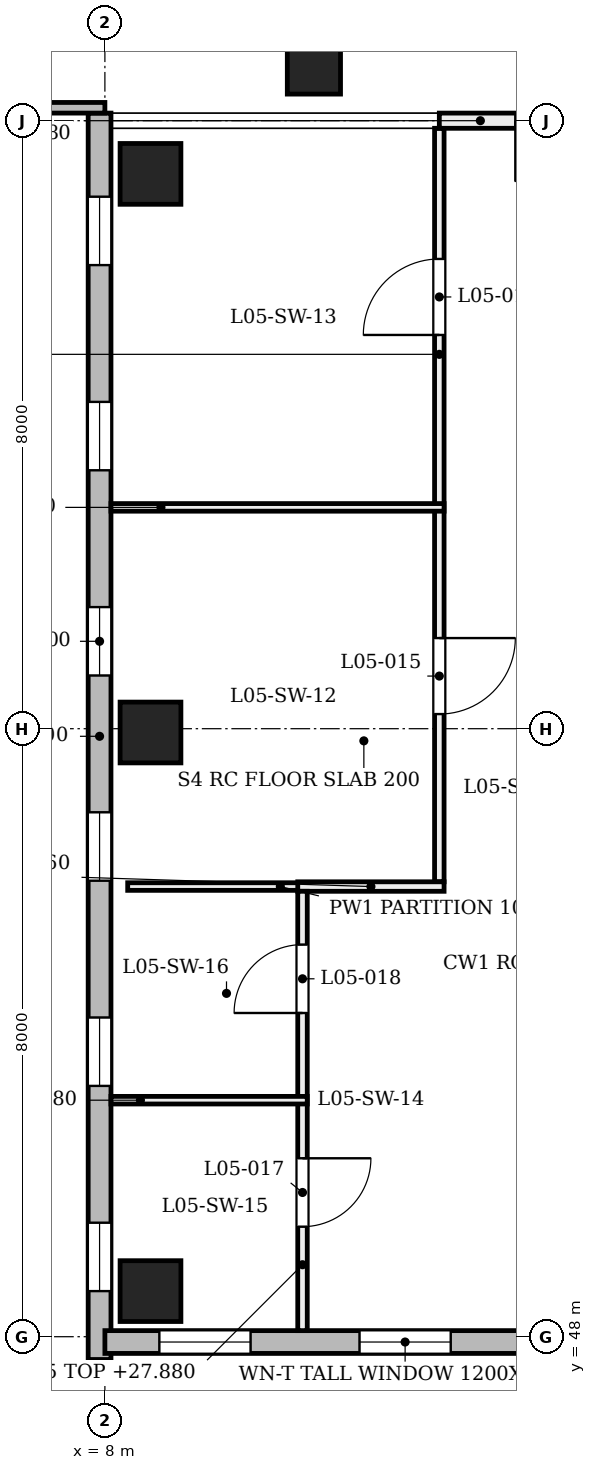
"""IFC4 building model, lengths in metres.
Left out: names, types, materials, properties, quantities, classifications, styles, units other than length and angle.
Written with IfcOpenShell. Run it as: python <this file> out.ifc"""

import sys

from ifc_helpers import new_model, si_unit, direction, frame, frame_2d, origin, origin_2d, place, context, subcontext, project, spatial, rectangle, extrude, element, fill, save


model = new_model("IFC4")
c1 = context("Model", 3, precision=1e-05, world=origin(), true_north=direction((0.0, 1.0)))
c2 = subcontext(c1, "Body", "Model", "MODEL_VIEW")
j1 = project(units=[si_unit("LENGTHUNIT", "METRE"), si_unit("PLANEANGLEUNIT", "RADIAN")], contexts=[c1])
p1 = place(None, origin())
s1 = spatial("IfcSite", under=j1, at=p1, CompositionType="ELEMENT")
p2 = place(p1, origin())
s2 = spatial("IfcBuilding", under=s1, at=p2, CompositionType="ELEMENT")
p3 = place(p2, frame((0.0, 0.0, 24.0)))
s3 = spatial("IfcBuildingStorey", under=s2, at=p3, CompositionType="ELEMENT", Elevation=24.0)
for number, where, z_axis, x_axis in (
    (1, (8.6, 48.6, 0.0), (0.0, 0.0, 1.0), (1.0, 0.0, 0.0)),
    (2, (8.6, 55.95, 0.0), (0.0, 0.0, 1.0), (1.0, 0.0, 0.0)),
    (3, (8.6, 63.3, 0.0), (0.0, 0.0, 1.0), (1.0, 0.0, 0.0)),
):
    element("IfcColumn", number, at=place(p3, frame(where, z_axis=z_axis, x_axis=x_axis)), inside=s3, PredefinedType="COLUMN", context=c2, shape_type="SweptSolid", body=[
        extrude(rectangle(XDim=0.8, YDim=0.8, at=origin_2d()), origin(), (0.0, 0.0, 1.0), 4.8),
    ])
p4 = place(p3, frame((11.0, 64.7, 0.0), z_axis=(-0.203937582782, 0.0, 0.978983892783), x_axis=(0.0, -1.0, 0.0)))
e4 = element("IfcColumn", 4, at=p4, inside=s3, PredefinedType="COLUMN", context=c2, shape_type="SweptSolid", body=[
    extrude(rectangle(XDim=0.7, YDim=0.7, at=origin_2d()), origin(), (0.0, 0.0, 1.0), 4.678),
])
p5 = place(p3, frame((7.93, 47.7, 0.0), z_axis=(0.0, 0.0, 1.0), x_axis=(0.0, 1.0, 0.0)))
e5 = element("IfcWall", 5, at=p5, inside=s3, PredefinedType="SOLIDWALL", context=c2, shape_type="SweptSolid", body=[
    extrude(rectangle(XDim=16.4, YDim=0.3, at=frame_2d((8.2, 0.0))), origin(), (0.0, 0.0, 1.0), 3.9),
])
p6 = place(p5, frame((0.9, 0.0, 0.75)))
e6 = element("IfcOpeningElement", 6, at=p6, cuts=e5, PredefinedType="OPENING", context=c2, shape_type="SweptSolid", body=[
    extrude(rectangle(XDim=0.9, YDim=3.1, at=frame_2d((0.45, 1.55))), frame((0.0, 0.16, 0.0), z_axis=(0.0, -1.0, 0.0), x_axis=(1.0, 0.0, 0.0)), (0.0, 0.0, 1.0), 0.32),
])
p7 = place(p5, frame((3.6, 0.0, 0.75)))
e7 = element("IfcOpeningElement", 7, at=p7, cuts=e5, PredefinedType="OPENING", context=c2, shape_type="SweptSolid", body=[
    extrude(rectangle(XDim=0.9, YDim=3.1, at=frame_2d((0.45, 1.55))), frame((0.0, 0.16, 0.0), z_axis=(0.0, -1.0, 0.0), x_axis=(1.0, 0.0, 0.0)), (0.0, 0.0, 1.0), 0.32),
])
p8 = place(p5, frame((6.3, 0.0, 0.75)))
e8 = element("IfcOpeningElement", 8, at=p8, cuts=e5, PredefinedType="OPENING", context=c2, shape_type="SweptSolid", body=[
    extrude(rectangle(XDim=0.9, YDim=3.1, at=frame_2d((0.45, 1.55))), frame((0.0, 0.16, 0.0), z_axis=(0.0, -1.0, 0.0), x_axis=(1.0, 0.0, 0.0)), (0.0, 0.0, 1.0), 0.32),
])
p9 = place(p5, frame((9.0, 0.0, 0.75)))
e9 = element("IfcOpeningElement", 9, at=p9, cuts=e5, PredefinedType="OPENING", context=c2, shape_type="SweptSolid", body=[
    extrude(rectangle(XDim=0.9, YDim=3.1, at=frame_2d((0.45, 1.55))), frame((0.0, 0.16, 0.0), z_axis=(0.0, -1.0, 0.0), x_axis=(1.0, 0.0, 0.0)), (0.0, 0.0, 1.0), 0.32),
])
p10 = place(p5, frame((11.7, 0.0, 0.75)))
e10 = element("IfcOpeningElement", 10, at=p10, cuts=e5, PredefinedType="OPENING", context=c2, shape_type="SweptSolid", body=[
    extrude(rectangle(XDim=0.9, YDim=3.1, at=frame_2d((0.45, 1.55))), frame((0.0, 0.16, 0.0), z_axis=(0.0, -1.0, 0.0), x_axis=(1.0, 0.0, 0.0)), (0.0, 0.0, 1.0), 0.32),
])
p11 = place(p5, frame((14.4, 0.0, 0.75)))
e11 = element("IfcOpeningElement", 11, at=p11, cuts=e5, PredefinedType="OPENING", context=c2, shape_type="SweptSolid", body=[
    extrude(rectangle(XDim=0.9, YDim=3.1, at=frame_2d((0.45, 1.55))), frame((0.0, 0.16, 0.0), z_axis=(0.0, -1.0, 0.0), x_axis=(1.0, 0.0, 0.0)), (0.0, 0.0, 1.0), 0.32),
])
p12 = place(p3, frame((8.0, 47.93, 0.0), z_axis=(0.0, 0.0, 1.0), x_axis=(1.0, 0.0, 0.0)))
e12 = element("IfcWall", 12, at=p12, inside=s3, PredefinedType="SOLIDWALL", context=c2, shape_type="SweptSolid", body=[
    extrude(rectangle(XDim=7.9, YDim=0.3, at=frame_2d((3.95, 0.0))), origin(), (0.0, 0.0, 1.0), 3.9),
])
p13 = place(p12, frame((0.717, 0.0, 0.75)))
e13 = element("IfcOpeningElement", 13, at=p13, cuts=e12, PredefinedType="OPENING", context=c2, shape_type="SweptSolid", body=[
    extrude(rectangle(XDim=1.2, YDim=3.1, at=frame_2d((0.6, 1.55))), frame((0.0, 0.16, 0.0), z_axis=(0.0, -1.0, 0.0), x_axis=(1.0, 0.0, 0.0)), (0.0, 0.0, 1.0), 0.32),
])
p14 = place(p12, frame((3.35, 0.0, 0.75)))
e14 = element("IfcOpeningElement", 14, at=p14, cuts=e12, PredefinedType="OPENING", context=c2, shape_type="SweptSolid", body=[
    extrude(rectangle(XDim=1.2, YDim=3.1, at=frame_2d((0.6, 1.55))), frame((0.0, 0.16, 0.0), z_axis=(0.0, -1.0, 0.0), x_axis=(1.0, 0.0, 0.0)), (0.0, 0.0, 1.0), 0.32),
])
p15 = place(p12, frame((5.983, 0.0, 0.75)))
e15 = element("IfcOpeningElement", 15, at=p15, cuts=e12, PredefinedType="OPENING", context=c2, shape_type="SweptSolid", body=[
    extrude(rectangle(XDim=1.2, YDim=3.1, at=frame_2d((0.6, 1.55))), frame((0.0, 0.16, 0.0), z_axis=(0.0, -1.0, 0.0), x_axis=(1.0, 0.0, 0.0)), (0.0, 0.0, 1.0), 0.32),
])
p16 = place(p3, frame((3.0, 64.17, 0.0), z_axis=(0.0, 0.0, 1.0), x_axis=(1.0, 0.0, 0.0)))
e16 = element("IfcWall", 16, at=p16, inside=s3, PredefinedType="SOLIDWALL", context=c2, shape_type="SweptSolid", body=[
    extrude(rectangle(XDim=5.0, YDim=0.14, at=frame_2d((2.5, 0.0))), origin(), (0.0, 0.0, 1.0), 3.9),
])
p17 = place(p3, frame((12.4, 53.986, 0.0), z_axis=(0.0, 0.0, 1.0), x_axis=(0.0, 1.0, 0.0)))
e17 = element("IfcWall", 17, at=p17, inside=s3, PredefinedType="PARTITIONING", context=c2, shape_type="SweptSolid", body=[
    extrude(rectangle(XDim=9.914, YDim=0.125, at=frame_2d((4.957, 0.0))), origin(), (0.0, 0.0, 1.0), 3.88),
])
p18 = place(p17, frame((2.207, 0.0, 0.0)))
e18 = element("IfcOpeningElement", 18, at=p18, cuts=e17, PredefinedType="OPENING", context=c2, shape_type="SweptSolid", body=[
    extrude(rectangle(XDim=1.0, YDim=2.1, at=frame_2d((0.5, 1.05))), frame((0.0, 0.073, 0.0), z_axis=(0.0, -1.0, 0.0), x_axis=(1.0, 0.0, 0.0)), (0.0, 0.0, 1.0), 0.145),
])
p19 = place(p17, frame((7.195, 0.0, 0.0)))
e19 = element("IfcOpeningElement", 19, at=p19, cuts=e17, PredefinedType="OPENING", context=c2, shape_type="SweptSolid", body=[
    extrude(rectangle(XDim=1.0, YDim=2.1, at=frame_2d((0.5, 1.05))), frame((0.0, 0.073, 0.0), z_axis=(0.0, -1.0, 0.0), x_axis=(1.0, 0.0, 0.0)), (0.0, 0.0, 1.0), 0.145),
])
p20 = place(p3, frame((8.3, 53.923, 0.0), z_axis=(0.0, 0.0, 1.0), x_axis=(1.0, 0.0, 0.0)))
e20 = element("IfcWall", 20, at=p20, inside=s3, PredefinedType="PARTITIONING", context=c2, shape_type="SweptSolid", body=[
    extrude(rectangle(XDim=2.363, YDim=0.1, at=frame_2d((1.181, 0.0))), origin(), (0.0, 0.0, 1.0), 3.98),
])
p21 = place(p3, frame((10.538, 53.923, 0.0), z_axis=(0.0, 0.0, 1.0), x_axis=(1.0, 0.0, 0.0)))
e21 = element("IfcWall", 21, at=p21, inside=s3, PredefinedType="PARTITIONING", context=c2, shape_type="SweptSolid", body=[
    extrude(rectangle(XDim=1.925, YDim=0.125, at=frame_2d((0.962, 0.0))), origin(), (0.0, 0.0, 1.0), 4.56),
])
p22 = place(p3, frame((8.08, 58.912, 0.0), z_axis=(0.0, 0.0, 1.0), x_axis=(1.0, 0.0, 0.0)))
e22 = element("IfcWall", 22, at=p22, inside=s3, PredefinedType="PARTITIONING", context=c2, shape_type="SweptSolid", body=[
    extrude(rectangle(XDim=4.382, YDim=0.1, at=frame_2d((2.191, 0.0))), origin(), (0.0, 0.0, 1.0), 3.88),
])
p23 = place(p3, frame((10.6, 48.08, 0.0), z_axis=(0.0, 0.0, 1.0), x_axis=(0.0, 1.0, 0.0)))
e23 = element("IfcWall", 23, at=p23, inside=s3, PredefinedType="PARTITIONING", context=c2, shape_type="SweptSolid", body=[
    extrude(rectangle(XDim=5.781, YDim=0.125, at=frame_2d((2.89, 0.0))), origin(), (0.0, 0.0, 1.0), 3.88),
])
p24 = place(p23, frame((1.368, 0.0, 0.0)))
e24 = element("IfcOpeningElement", 24, at=p24, cuts=e23, PredefinedType="OPENING", context=c2, shape_type="SweptSolid", body=[
    extrude(rectangle(XDim=0.9, YDim=2.1, at=frame_2d((0.45, 1.05))), frame((0.0, 0.073, 0.0), z_axis=(0.0, -1.0, 0.0), x_axis=(1.0, 0.0, 0.0)), (0.0, 0.0, 1.0), 0.145),
])
p25 = place(p23, frame((4.179, 0.0, 0.0)))
e25 = element("IfcOpeningElement", 25, at=p25, cuts=e23, PredefinedType="OPENING", context=c2, shape_type="SweptSolid", body=[
    extrude(rectangle(XDim=0.9, YDim=2.1, at=frame_2d((0.45, 1.05))), frame((0.0, 0.073, 0.0), z_axis=(0.0, -1.0, 0.0), x_axis=(1.0, 0.0, 0.0)), (0.0, 0.0, 1.0), 0.145),
])
p26 = place(p3, frame((8.08, 51.112, 0.0), z_axis=(0.0, 0.0, 1.0), x_axis=(1.0, 0.0, 0.0)))
e26 = element("IfcWall", 26, at=p26, inside=s3, PredefinedType="PARTITIONING", context=c2, shape_type="SweptSolid", body=[
    extrude(rectangle(XDim=2.583, YDim=0.1, at=frame_2d((1.291, 0.0))), origin(), (0.0, 0.0, 1.0), 3.88),
])
p27 = place(p3, frame((12.4, 64.0, 0.0), z_axis=(0.0, 0.0, 1.0), x_axis=(1.0, 0.0, 0.0)))
e27 = element("IfcWall", 27, at=p27, inside=s3, PredefinedType="PARTITIONING", context=c2, shape_type="SweptSolid", body=[
    extrude(rectangle(XDim=3.6, YDim=0.2, at=frame_2d((1.8, 0.0))), origin(), (0.0, 0.0, 1.0), 3.88),
])
p28 = place(p27, frame((1.0, 0.0, 0.0)))
e28 = element("IfcOpeningElement", 28, at=p28, cuts=e27, PredefinedType="OPENING", context=c2, shape_type="SweptSolid", body=[
    extrude(rectangle(XDim=1.6, YDim=2.1, at=frame_2d((0.8, 1.05))), frame((0.0, 0.11, 0.0), z_axis=(0.0, -1.0, 0.0), x_axis=(1.0, 0.0, 0.0)), (0.0, 0.0, 1.0), 0.22),
])
p29 = place(p6, origin())
e29 = element("IfcWindow", 29, at=p29, inside=s3, PartitioningType="SINGLE_PANEL", PredefinedType="WINDOW", context=c2, shape_type="SweptSolid", body=[
    extrude(rectangle(XDim=0.9, YDim=3.1, at=frame_2d((0.45, 1.55))), frame((0.0, 0.03, 0.0), z_axis=(0.0, -1.0, 0.0), x_axis=(1.0, 0.0, 0.0)), (0.0, 0.0, 1.0), 0.06),
])
fill(e6, e29)
p30 = place(p7, origin())
e30 = element("IfcWindow", 30, at=p30, inside=s3, PartitioningType="SINGLE_PANEL", PredefinedType="WINDOW", context=c2, shape_type="SweptSolid", body=[
    extrude(rectangle(XDim=0.9, YDim=3.1, at=frame_2d((0.45, 1.55))), frame((0.0, 0.03, 0.0), z_axis=(0.0, -1.0, 0.0), x_axis=(1.0, 0.0, 0.0)), (0.0, 0.0, 1.0), 0.06),
])
fill(e7, e30)
p31 = place(p8, origin())
e31 = element("IfcWindow", 31, at=p31, inside=s3, PartitioningType="SINGLE_PANEL", PredefinedType="WINDOW", context=c2, shape_type="SweptSolid", body=[
    extrude(rectangle(XDim=0.9, YDim=3.1, at=frame_2d((0.45, 1.55))), frame((0.0, 0.03, 0.0), z_axis=(0.0, -1.0, 0.0), x_axis=(1.0, 0.0, 0.0)), (0.0, 0.0, 1.0), 0.06),
])
fill(e8, e31)
p32 = place(p9, origin())
e32 = element("IfcWindow", 32, at=p32, inside=s3, PartitioningType="SINGLE_PANEL", PredefinedType="WINDOW", context=c2, shape_type="SweptSolid", body=[
    extrude(rectangle(XDim=0.9, YDim=3.1, at=frame_2d((0.45, 1.55))), frame((0.0, 0.03, 0.0), z_axis=(0.0, -1.0, 0.0), x_axis=(1.0, 0.0, 0.0)), (0.0, 0.0, 1.0), 0.06),
])
fill(e9, e32)
p33 = place(p10, origin())
e33 = element("IfcWindow", 33, at=p33, inside=s3, PartitioningType="SINGLE_PANEL", PredefinedType="WINDOW", context=c2, shape_type="SweptSolid", body=[
    extrude(rectangle(XDim=0.9, YDim=3.1, at=frame_2d((0.45, 1.55))), frame((0.0, 0.03, 0.0), z_axis=(0.0, -1.0, 0.0), x_axis=(1.0, 0.0, 0.0)), (0.0, 0.0, 1.0), 0.06),
])
fill(e10, e33)
p34 = place(p11, origin())
e34 = element("IfcWindow", 34, at=p34, inside=s3, PartitioningType="SINGLE_PANEL", PredefinedType="WINDOW", context=c2, shape_type="SweptSolid", body=[
    extrude(rectangle(XDim=0.9, YDim=3.1, at=frame_2d((0.45, 1.55))), frame((0.0, 0.03, 0.0), z_axis=(0.0, -1.0, 0.0), x_axis=(1.0, 0.0, 0.0)), (0.0, 0.0, 1.0), 0.06),
])
fill(e11, e34)
p35 = place(p13, origin())
e35 = element("IfcWindow", 35, at=p35, inside=s3, PartitioningType="SINGLE_PANEL", PredefinedType="WINDOW", context=c2, shape_type="SweptSolid", body=[
    extrude(rectangle(XDim=1.2, YDim=3.1, at=frame_2d((0.6, 1.55))), frame((0.0, 0.03, 0.0), z_axis=(0.0, -1.0, 0.0), x_axis=(1.0, 0.0, 0.0)), (0.0, 0.0, 1.0), 0.06),
])
fill(e13, e35)
p36 = place(p14, origin())
e36 = element("IfcWindow", 36, at=p36, inside=s3, PartitioningType="SINGLE_PANEL", PredefinedType="WINDOW", context=c2, shape_type="SweptSolid", body=[
    extrude(rectangle(XDim=1.2, YDim=3.1, at=frame_2d((0.6, 1.55))), frame((0.0, 0.03, 0.0), z_axis=(0.0, -1.0, 0.0), x_axis=(1.0, 0.0, 0.0)), (0.0, 0.0, 1.0), 0.06),
])
fill(e14, e36)
p37 = place(p18, origin())
e37 = element("IfcDoor", 37, at=p37, inside=s3, OperationType="SINGLE_SWING_RIGHT", PredefinedType="DOOR", context=c2, shape_type="SweptSolid", body=[
    extrude(rectangle(XDim=1.0, YDim=2.1, at=frame_2d((0.5, 1.05))), frame((0.0, 0.025, 0.0), z_axis=(0.0, -1.0, 0.0), x_axis=(1.0, 0.0, 0.0)), (0.0, 0.0, 1.0), 0.05),
])
fill(e18, e37)
p38 = place(p19, origin())
e38 = element("IfcDoor", 38, at=p38, inside=s3, OperationType="SINGLE_SWING_LEFT", PredefinedType="DOOR", context=c2, shape_type="SweptSolid", body=[
    extrude(rectangle(XDim=1.0, YDim=2.1, at=frame_2d((0.5, 1.05))), frame((0.0, 0.025, 0.0), z_axis=(0.0, -1.0, 0.0), x_axis=(1.0, 0.0, 0.0)), (0.0, 0.0, 1.0), 0.05),
])
fill(e19, e38)
p39 = place(p24, origin())
e39 = element("IfcDoor", 39, at=p39, inside=s3, OperationType="SINGLE_SWING_RIGHT", PredefinedType="DOOR", context=c2, shape_type="SweptSolid", body=[
    extrude(rectangle(XDim=0.9, YDim=2.1, at=frame_2d((0.45, 1.05))), frame((0.0, 0.025, 0.0), z_axis=(0.0, -1.0, 0.0), x_axis=(1.0, 0.0, 0.0)), (0.0, 0.0, 1.0), 0.05),
])
fill(e24, e39)
p40 = place(p25, origin())
e40 = element("IfcDoor", 40, at=p40, inside=s3, OperationType="SINGLE_SWING_LEFT", PredefinedType="DOOR", context=c2, shape_type="SweptSolid", body=[
    extrude(rectangle(XDim=0.9, YDim=2.1, at=frame_2d((0.45, 1.05))), frame((0.0, 0.025, 0.0), z_axis=(0.0, -1.0, 0.0), x_axis=(1.0, 0.0, 0.0)), (0.0, 0.0, 1.0), 0.05),
])
fill(e25, e40)
save(model, sys.argv[1])
